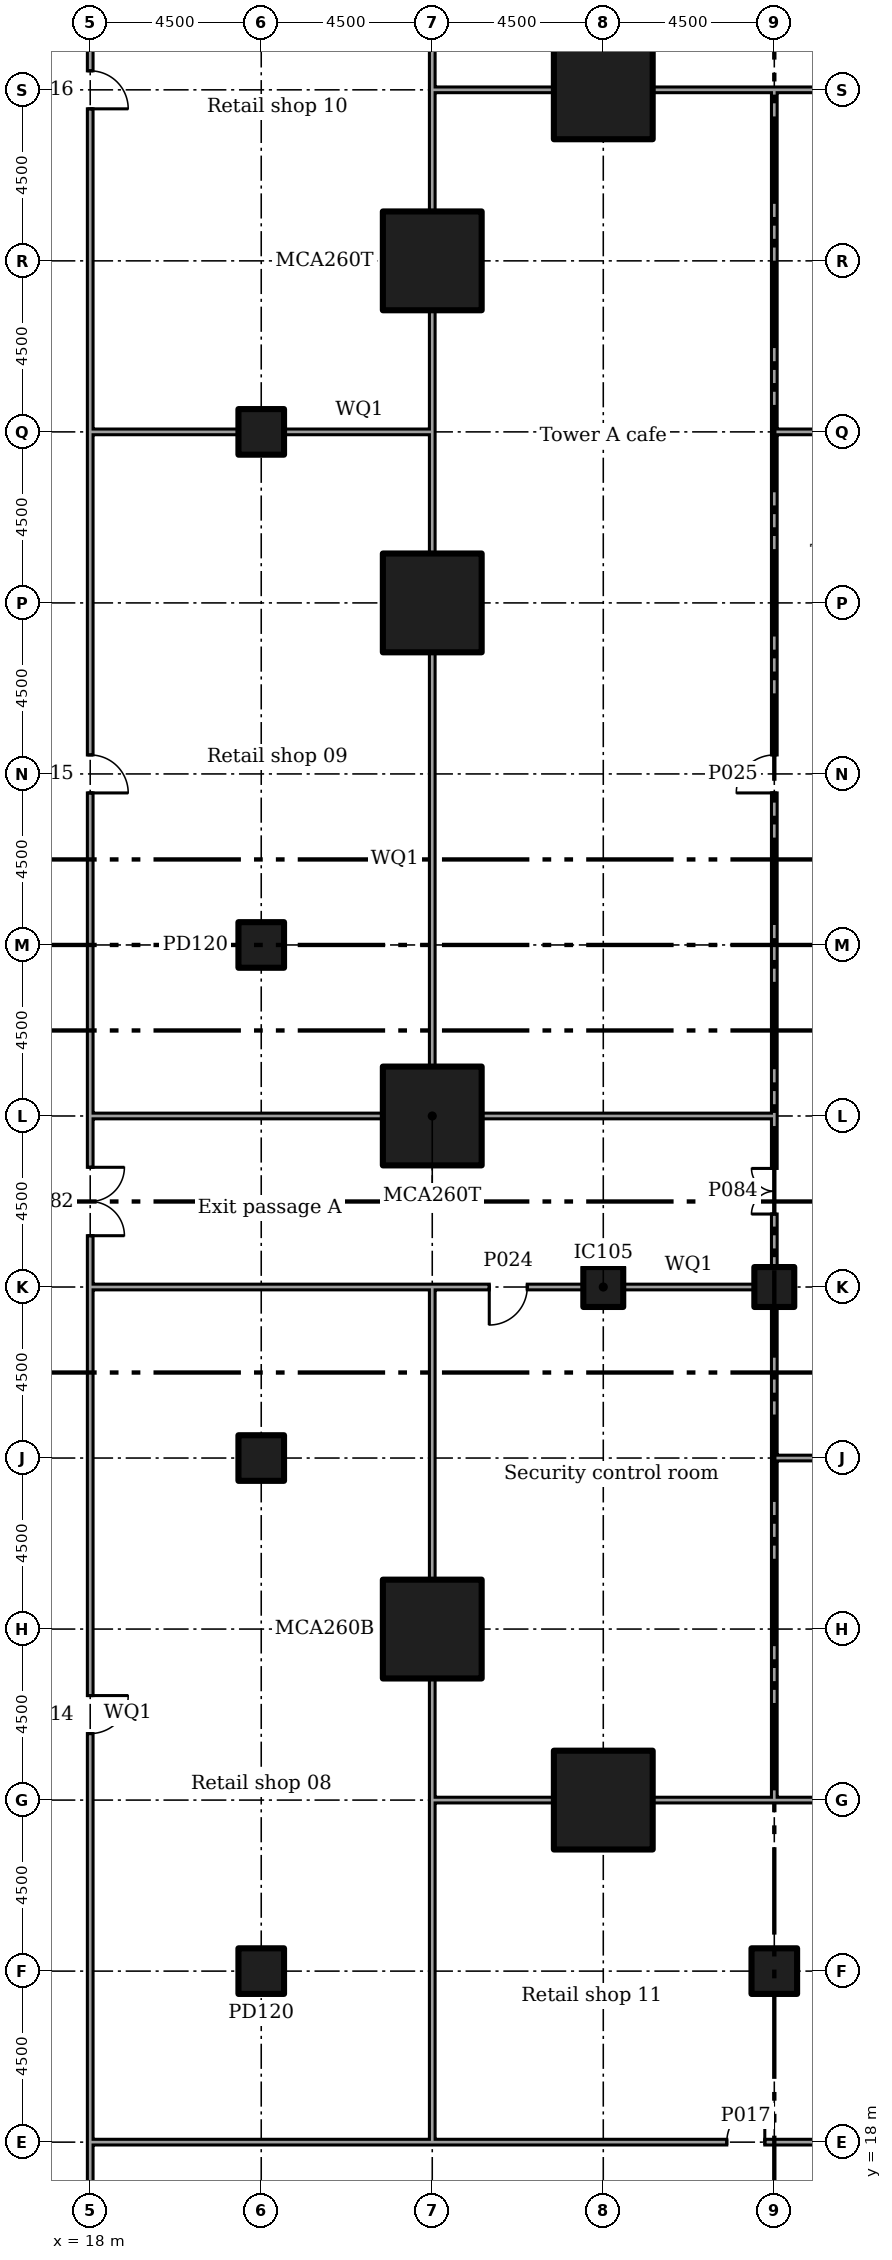
"""IFC4 building model, lengths in metres.
Left out: names, types, materials, properties, quantities, classifications, styles, units other than length and angle.
Written with IfcOpenShell. Run it as: python <this file> out.ifc"""

import sys

from ifc_helpers import new_model, si_unit, direction, frame, frame_2d, origin, origin_2d, place, context, subcontext, project, spatial, rectangle, extrude, element, fill, save


model = new_model("IFC4")
c1 = context("Model", 3, precision=1e-05, world=origin(), true_north=direction((0.0, 1.0)))
c2 = subcontext(c1, "Body", "Model", "MODEL_VIEW")
j1 = project(units=[si_unit("LENGTHUNIT", "METRE"), si_unit("PLANEANGLEUNIT", "RADIAN")], contexts=[c1])
p1 = place(None, origin())
s1 = spatial("IfcSite", under=j1, at=p1, CompositionType="ELEMENT")
p2 = place(p1, origin())
s2 = spatial("IfcBuilding", under=s1, at=p2, CompositionType="ELEMENT")
p3 = place(p2, origin())
s3 = spatial("IfcBuildingStorey", under=s2, at=p3, CompositionType="ELEMENT", Elevation=0.0)
for number, where in (
    (1, (27.0, 31.5, 0.0)),
    (2, (27.0, 45.0, 0.0)),
    (3, (27.0, 58.5, 0.0)),
    (4, (27.0, 67.5, 0.0)),
    (5, (31.5, 27.0, 0.0)),
    (6, (31.5, 72.0, 0.0)),
):
    element("IfcColumn", number, at=place(p3, frame(where)), inside=s3, PredefinedType="COLUMN", context=c2, shape_type="SweptSolid", body=[
        extrude(rectangle(XDim=2.6, YDim=2.6, at=origin_2d()), origin(), (0.0, 0.0, 1.0), 6.0),
    ])
for number, where in (
    (7, (31.5, 40.5, 0.0)),
    (8, (36.0, 40.5, 0.0)),
):
    element("IfcColumn", number, at=place(p3, frame(where)), inside=s3, PredefinedType="COLUMN", context=c2, shape_type="SweptSolid", body=[
        extrude(rectangle(XDim=1.05, YDim=1.05, at=origin_2d()), origin(), (0.0, 0.0, 1.0), 6.0),
    ])
for number, where in (
    (9, (22.5, 22.5, 0.0)),
    (10, (22.5, 36.0, 0.0)),
    (11, (22.5, 49.5, 0.0)),
    (12, (22.5, 63.0, 0.0)),
    (13, (36.0, 22.5, 0.0)),
):
    element("IfcColumn", number, at=place(p3, frame(where)), inside=s3, PredefinedType="COLUMN", context=c2, shape_type="SweptSolid", body=[
        extrude(rectangle(XDim=1.2, YDim=1.2, at=origin_2d()), origin(), (0.0, 0.0, 1.0), 6.0),
    ])
p4 = place(p3, frame((18.0, 9.075, 0.0), z_axis=(0.0, 0.0, 1.0), x_axis=(0.0, 1.0, 0.0)))
e14 = element("IfcWall", 14, at=p4, inside=s3, PredefinedType="PARTITIONING", context=c2, shape_type="SweptSolid", body=[
    extrude(rectangle(XDim=9.0, YDim=0.15, at=frame_2d((4.5, 0.0))), origin(), (0.0, 0.0, 1.0), 5.55),
])
p5 = place(p4, frame((3.525, 0.0, 0.0)))
e15 = element("IfcOpeningElement", 15, at=p5, cuts=e14, PredefinedType="OPENING", context=c2, shape_type="SweptSolid", body=[
    extrude(rectangle(XDim=1.8, YDim=2.1, at=frame_2d((0.9, 1.05))), frame((0.0, 0.085, 0.0), z_axis=(0.0, -1.0, 0.0), x_axis=(1.0, 0.0, 0.0)), (0.0, 0.0, 1.0), 0.17),
])
p6 = place(p3, frame((18.075, 18.0, 0.0)))
e16 = element("IfcWall", 16, at=p6, inside=s3, PredefinedType="PARTITIONING", context=c2, shape_type="SweptSolid", body=[
    extrude(rectangle(XDim=9.0, YDim=0.15, at=frame_2d((4.5, 0.0))), origin(), (0.0, 0.0, 1.0), 5.55),
])
p7 = place(p3, frame((27.0, 18.0, 0.0)))
e17 = element("IfcWall", 17, at=p7, inside=s3, PredefinedType="PARTITIONING", context=c2, shape_type="SweptSolid", body=[
    extrude(rectangle(XDim=16.575, YDim=0.15, at=frame_2d((8.288, 0.0))), origin(), (0.0, 0.0, 1.0), 5.55),
])
p8 = place(p7, frame((7.75, 0.0, 0.0)))
e18 = element("IfcOpeningElement", 18, at=p8, cuts=e17, PredefinedType="OPENING", context=c2, shape_type="SweptSolid", body=[
    extrude(rectangle(XDim=1.0, YDim=2.1, at=frame_2d((0.5, 1.05))), frame((0.0, 0.085, 0.0), z_axis=(0.0, -1.0, 0.0), x_axis=(1.0, 0.0, 0.0)), (0.0, 0.0, 1.0), 0.17),
])
p9 = place(p3, frame((18.0, 18.0, 0.0), z_axis=(0.0, 0.0, 1.0), x_axis=(0.0, 1.0, 0.0)))
e19 = element("IfcWall", 19, at=p9, inside=s3, PredefinedType="PARTITIONING", context=c2, shape_type="SweptSolid", body=[
    extrude(rectangle(XDim=22.575, YDim=0.15, at=frame_2d((11.288, 0.0))), origin(), (0.0, 0.0, 1.0), 5.55),
])
p10 = place(p9, frame((10.75, 0.0, 0.0)))
e20 = element("IfcOpeningElement", 20, at=p10, cuts=e19, PredefinedType="OPENING", context=c2, shape_type="SweptSolid", body=[
    extrude(rectangle(XDim=1.0, YDim=2.1, at=frame_2d((0.5, 1.05))), frame((0.0, 0.085, 0.0), z_axis=(0.0, -1.0, 0.0), x_axis=(1.0, 0.0, 0.0)), (0.0, 0.0, 1.0), 0.17),
])
p11 = place(p3, frame((18.0, 40.5, 0.0), z_axis=(0.0, 0.0, 1.0), x_axis=(0.0, 1.0, 0.0)))
e21 = element("IfcWall", 21, at=p11, inside=s3, PredefinedType="PARTITIONING", context=c2, shape_type="SweptSolid", body=[
    extrude(rectangle(XDim=4.575, YDim=0.15, at=frame_2d((2.288, 0.0))), origin(), (0.0, 0.0, 1.0), 5.55),
])
p12 = place(p11, frame((1.35, 0.0, 0.0)))
e22 = element("IfcOpeningElement", 22, at=p12, cuts=e21, PredefinedType="OPENING", context=c2, shape_type="SweptSolid", body=[
    extrude(rectangle(XDim=1.8, YDim=2.1, at=frame_2d((0.9, 1.05))), frame((0.0, 0.085, 0.0), z_axis=(0.0, -1.0, 0.0), x_axis=(1.0, 0.0, 0.0)), (0.0, 0.0, 1.0), 0.17),
])
p13 = place(p3, frame((18.0, 45.0, 0.0), z_axis=(0.0, 0.0, 1.0), x_axis=(0.0, 1.0, 0.0)))
e23 = element("IfcWall", 23, at=p13, inside=s3, PredefinedType="PARTITIONING", context=c2, shape_type="SweptSolid", body=[
    extrude(rectangle(XDim=18.075, YDim=0.15, at=frame_2d((9.038, 0.0))), origin(), (0.0, 0.0, 1.0), 5.55),
])
p14 = place(p13, frame((8.5, 0.0, 0.0)))
e24 = element("IfcOpeningElement", 24, at=p14, cuts=e23, PredefinedType="OPENING", context=c2, shape_type="SweptSolid", body=[
    extrude(rectangle(XDim=1.0, YDim=2.1, at=frame_2d((0.5, 1.05))), frame((0.0, 0.085, 0.0), z_axis=(0.0, -1.0, 0.0), x_axis=(1.0, 0.0, 0.0)), (0.0, 0.0, 1.0), 0.17),
])
p15 = place(p3, frame((18.0, 63.0, 0.0), z_axis=(0.0, 0.0, 1.0), x_axis=(0.0, 1.0, 0.0)))
e25 = element("IfcWall", 25, at=p15, inside=s3, PredefinedType="PARTITIONING", context=c2, shape_type="SweptSolid", body=[
    extrude(rectangle(XDim=18.0, YDim=0.15, at=frame_2d((9.0, 0.0))), origin(), (0.0, 0.0, 1.0), 5.55),
])
p16 = place(p15, frame((8.5, 0.0, 0.0)))
e26 = element("IfcOpeningElement", 26, at=p16, cuts=e25, PredefinedType="OPENING", context=c2, shape_type="SweptSolid", body=[
    extrude(rectangle(XDim=1.0, YDim=2.1, at=frame_2d((0.5, 1.05))), frame((0.0, 0.085, 0.0), z_axis=(0.0, -1.0, 0.0), x_axis=(1.0, 0.0, 0.0)), (0.0, 0.0, 1.0), 0.17),
])
p17 = place(p3, frame((18.075, 40.5, 0.0)))
e27 = element("IfcWall", 27, at=p17, inside=s3, PredefinedType="PARTITIONING", context=c2, shape_type="SweptSolid", body=[
    extrude(rectangle(XDim=9.0, YDim=0.15, at=frame_2d((4.5, 0.0))), origin(), (0.0, 0.0, 1.0), 5.55),
])
p18 = place(p3, frame((27.0, 18.075, 0.0), z_axis=(0.0, 0.0, 1.0), x_axis=(0.0, 1.0, 0.0)))
e28 = element("IfcWall", 28, at=p18, inside=s3, PredefinedType="PARTITIONING", context=c2, shape_type="SweptSolid", body=[
    extrude(rectangle(XDim=9.0, YDim=0.15, at=frame_2d((4.5, 0.0))), origin(), (0.0, 0.0, 1.0), 5.55),
])
p19 = place(p3, frame((27.0, 27.0, 0.0), z_axis=(0.0, 0.0, 1.0), x_axis=(0.0, 1.0, 0.0)))
e29 = element("IfcWall", 29, at=p19, inside=s3, PredefinedType="PARTITIONING", context=c2, shape_type="SweptSolid", body=[
    extrude(rectangle(XDim=3.205, YDim=0.15, at=frame_2d((1.603, 0.0))), origin(), (0.0, 0.0, 1.0), 5.55),
])
p20 = place(p3, frame((27.0, 32.795, 0.0), z_axis=(0.0, 0.0, 1.0), x_axis=(0.0, 1.0, 0.0)))
e30 = element("IfcWall", 30, at=p20, inside=s3, PredefinedType="PARTITIONING", context=c2, shape_type="SweptSolid", body=[
    extrude(rectangle(XDim=7.63, YDim=0.15, at=frame_2d((3.815, 0.0))), origin(), (0.0, 0.0, 1.0), 5.55),
])
p21 = place(p3, frame((18.075, 45.0, 0.0)))
e31 = element("IfcWall", 31, at=p21, inside=s3, PredefinedType="PARTITIONING", context=c2, shape_type="SweptSolid", body=[
    extrude(rectangle(XDim=7.63, YDim=0.15, at=frame_2d((3.815, 0.0))), origin(), (0.0, 0.0, 1.0), 5.55),
])
p22 = place(p3, frame((27.0, 40.5, 0.0)))
e32 = element("IfcWall", 32, at=p22, inside=s3, PredefinedType="PARTITIONING", context=c2, shape_type="SweptSolid", body=[
    extrude(rectangle(XDim=3.98, YDim=0.15, at=frame_2d((1.99, 0.0))), origin(), (0.0, 0.0, 1.0), 5.55),
])
p23 = place(p22, frame((1.5, 0.0, 0.0)))
e33 = element("IfcOpeningElement", 33, at=p23, cuts=e32, PredefinedType="OPENING", context=c2, shape_type="SweptSolid", body=[
    extrude(rectangle(XDim=1.0, YDim=2.1, at=frame_2d((0.5, 1.05))), frame((0.0, 0.085, 0.0), z_axis=(0.0, -1.0, 0.0), x_axis=(1.0, 0.0, 0.0)), (0.0, 0.0, 1.0), 0.17),
])
p24 = place(p3, frame((32.02, 40.5, 0.0)))
e34 = element("IfcWall", 34, at=p24, inside=s3, PredefinedType="PARTITIONING", context=c2, shape_type="SweptSolid", body=[
    extrude(rectangle(XDim=3.46, YDim=0.15, at=frame_2d((1.73, 0.0))), origin(), (0.0, 0.0, 1.0), 5.55),
])
p25 = place(p3, frame((28.295, 45.0, 0.0)))
e35 = element("IfcWall", 35, at=p25, inside=s3, PredefinedType="PARTITIONING", context=c2, shape_type="SweptSolid", body=[
    extrude(rectangle(XDim=7.78, YDim=0.15, at=frame_2d((3.89, 0.0))), origin(), (0.0, 0.0, 1.0), 5.55),
])
p26 = place(p3, frame((36.0, 41.02, 0.0), z_axis=(0.0, 0.0, 1.0), x_axis=(0.0, 1.0, 0.0)))
e36 = element("IfcWall", 36, at=p26, inside=s3, PredefinedType="PARTITIONING", context=c2, shape_type="SweptSolid", body=[
    extrude(rectangle(XDim=3.905, YDim=0.15, at=frame_2d((1.953, 0.0))), origin(), (0.0, 0.0, 1.0), 5.55),
])
p27 = place(p26, frame((1.4, 0.0, 0.0)))
e37 = element("IfcOpeningElement", 37, at=p27, cuts=e36, PredefinedType="OPENING", context=c2, shape_type="SweptSolid", body=[
    extrude(rectangle(XDim=1.2, YDim=2.1, at=frame_2d((0.6, 1.05))), frame((0.0, 0.085, 0.0), z_axis=(0.0, -1.0, 0.0), x_axis=(1.0, 0.0, 0.0)), (0.0, 0.0, 1.0), 0.17),
])
p28 = place(p3, frame((18.075, 63.0, 0.0)))
e38 = element("IfcWall", 38, at=p28, inside=s3, PredefinedType="PARTITIONING", context=c2, shape_type="SweptSolid", body=[
    extrude(rectangle(XDim=3.83, YDim=0.15, at=frame_2d((1.915, 0.0))), origin(), (0.0, 0.0, 1.0), 5.55),
])
p29 = place(p3, frame((23.095, 63.0, 0.0)))
e39 = element("IfcWall", 39, at=p29, inside=s3, PredefinedType="PARTITIONING", context=c2, shape_type="SweptSolid", body=[
    extrude(rectangle(XDim=3.98, YDim=0.15, at=frame_2d((1.99, 0.0))), origin(), (0.0, 0.0, 1.0), 5.55),
])
p30 = place(p3, frame((27.0, 46.295, 0.0), z_axis=(0.0, 0.0, 1.0), x_axis=(0.0, 1.0, 0.0)))
e40 = element("IfcWall", 40, at=p30, inside=s3, PredefinedType="PARTITIONING", context=c2, shape_type="SweptSolid", body=[
    extrude(rectangle(XDim=10.91, YDim=0.15, at=frame_2d((5.455, 0.0))), origin(), (0.0, 0.0, 1.0), 5.55),
])
p31 = place(p3, frame((27.0, 59.795, 0.0), z_axis=(0.0, 0.0, 1.0), x_axis=(0.0, 1.0, 0.0)))
e41 = element("IfcWall", 41, at=p31, inside=s3, PredefinedType="PARTITIONING", context=c2, shape_type="SweptSolid", body=[
    extrude(rectangle(XDim=3.13, YDim=0.15, at=frame_2d((1.565, 0.0))), origin(), (0.0, 0.0, 1.0), 5.55),
])
p32 = place(p3, frame((27.0, 71.925, 0.0), z_axis=(0.0, 0.0, 1.0), x_axis=(0.0, 1.0, 0.0)))
e42 = element("IfcWall", 42, at=p32, inside=s3, PredefinedType="PARTITIONING", context=c2, shape_type="SweptSolid", body=[
    extrude(rectangle(XDim=9.0, YDim=0.15, at=frame_2d((4.5, 0.0))), origin(), (0.0, 0.0, 1.0), 5.55),
])
for number, where, z_axis, x_axis in (
    (43, (27.0, 63.0, 0.0), (0.0, 0.0, 1.0), (0.0, 1.0, 0.0)),
    (44, (27.0, 68.795, 0.0), (0.0, 0.0, 1.0), (0.0, 1.0, 0.0)),
):
    element("IfcWall", number, at=place(p3, frame(where, z_axis=z_axis, x_axis=x_axis)), inside=s3, PredefinedType="PARTITIONING", context=c2, shape_type="SweptSolid", body=[
        extrude(rectangle(XDim=3.205, YDim=0.15, at=frame_2d((1.603, 0.0))), origin(), (0.0, 0.0, 1.0), 5.55),
    ])
p33 = place(p3, frame((27.075, 27.0, 0.0)))
e45 = element("IfcWall", 45, at=p33, inside=s3, PredefinedType="PARTITIONING", context=c2, shape_type="SweptSolid", body=[
    extrude(rectangle(XDim=3.13, YDim=0.15, at=frame_2d((1.565, 0.0))), origin(), (0.0, 0.0, 1.0), 5.55),
])
p34 = place(p3, frame((32.795, 27.0, 0.0)))
e46 = element("IfcWall", 46, at=p34, inside=s3, PredefinedType="PARTITIONING", context=c2, shape_type="SweptSolid", body=[
    extrude(rectangle(XDim=3.28, YDim=0.15, at=frame_2d((1.64, 0.0))), origin(), (0.0, 0.0, 1.0), 5.55),
])
p35 = place(p3, frame((36.0, 27.0, 0.0)))
e47 = element("IfcWall", 47, at=p35, inside=s3, PredefinedType="PARTITIONING", context=c2, shape_type="SweptSolid", body=[
    extrude(rectangle(XDim=7.425, YDim=0.15, at=frame_2d((3.712, 0.0))), origin(), (0.0, 0.0, 1.0), 5.55),
])
p36 = place(p3, frame((27.075, 72.0, 0.0)))
e48 = element("IfcWall", 48, at=p36, inside=s3, PredefinedType="PARTITIONING", context=c2, shape_type="SweptSolid", body=[
    extrude(rectangle(XDim=3.13, YDim=0.15, at=frame_2d((1.565, 0.0))), origin(), (0.0, 0.0, 1.0), 5.55),
])
p37 = place(p3, frame((32.795, 72.0, 0.0)))
e49 = element("IfcWall", 49, at=p37, inside=s3, PredefinedType="PARTITIONING", context=c2, shape_type="SweptSolid", body=[
    extrude(rectangle(XDim=3.28, YDim=0.15, at=frame_2d((1.64, 0.0))), origin(), (0.0, 0.0, 1.0), 5.55),
])
p38 = place(p3, frame((36.0, 72.0, 0.0)))
e50 = element("IfcWall", 50, at=p38, inside=s3, PredefinedType="PARTITIONING", context=c2, shape_type="SweptSolid", body=[
    extrude(rectangle(XDim=6.0, YDim=0.15, at=frame_2d((3.0, 0.0))), origin(), (0.0, 0.0, 1.0), 5.55),
])
p39 = place(p3, frame((36.0, 27.075, 0.0), z_axis=(0.0, 0.0, 1.0), x_axis=(0.0, 1.0, 0.0)))
e51 = element("IfcWall", 51, at=p39, inside=s3, PredefinedType="PARTITIONING", context=c2, shape_type="SweptSolid", body=[
    extrude(rectangle(XDim=9.0, YDim=0.15, at=frame_2d((4.5, 0.0))), origin(), (0.0, 0.0, 1.0), 5.55),
])
p40 = place(p3, frame((36.0, 36.0, 0.0), z_axis=(0.0, 0.0, 1.0), x_axis=(0.0, 1.0, 0.0)))
e52 = element("IfcWall", 52, at=p40, inside=s3, PredefinedType="PARTITIONING", context=c2, shape_type="SweptSolid", body=[
    extrude(rectangle(XDim=3.98, YDim=0.15, at=frame_2d((1.99, 0.0))), origin(), (0.0, 0.0, 1.0), 5.55),
])
p41 = place(p3, frame((36.0, 62.925, 0.0), z_axis=(0.0, 0.0, 1.0), x_axis=(0.0, 1.0, 0.0)))
e53 = element("IfcWall", 53, at=p41, inside=s3, PredefinedType="PARTITIONING", context=c2, shape_type="SweptSolid", body=[
    extrude(rectangle(XDim=9.0, YDim=0.15, at=frame_2d((4.5, 0.0))), origin(), (0.0, 0.0, 1.0), 5.55),
])
p42 = place(p3, frame((36.0, 45.0, 0.0), z_axis=(0.0, 0.0, 1.0), x_axis=(0.0, 1.0, 0.0)))
e54 = element("IfcWall", 54, at=p42, inside=s3, PredefinedType="PARTITIONING", context=c2, shape_type="SweptSolid", body=[
    extrude(rectangle(XDim=18.0, YDim=0.15, at=frame_2d((9.0, 0.0))), origin(), (0.0, 0.0, 1.0), 5.55),
])
p43 = place(p42, frame((8.5, 0.0, 0.0)))
e55 = element("IfcOpeningElement", 55, at=p43, cuts=e54, PredefinedType="OPENING", context=c2, shape_type="SweptSolid", body=[
    extrude(rectangle(XDim=1.0, YDim=2.1, at=frame_2d((0.5, 1.05))), frame((0.0, 0.085, 0.0), z_axis=(0.0, -1.0, 0.0), x_axis=(1.0, 0.0, 0.0)), (0.0, 0.0, 1.0), 0.17),
])
p44 = place(p3, frame((36.075, 36.0, 0.0)))
e56 = element("IfcWall", 56, at=p44, inside=s3, PredefinedType="PARTITIONING", context=c2, shape_type="SweptSolid", body=[
    extrude(rectangle(XDim=14.425, YDim=0.15, at=frame_2d((7.212, 0.0))), origin(), (0.0, 0.0, 1.0), 5.55),
])
p45 = place(p44, frame((6.675, 0.0, 0.0)))
e57 = element("IfcOpeningElement", 57, at=p45, cuts=e56, PredefinedType="OPENING", context=c2, shape_type="SweptSolid", body=[
    extrude(rectangle(XDim=1.0, YDim=2.1, at=frame_2d((0.5, 1.05))), frame((0.0, 0.085, 0.0), z_axis=(0.0, -1.0, 0.0), x_axis=(1.0, 0.0, 0.0)), (0.0, 0.0, 1.0), 0.17),
])
p46 = place(p3, frame((36.075, 63.0, 0.0)))
e58 = element("IfcWall", 58, at=p46, inside=s3, PredefinedType="PARTITIONING", context=c2, shape_type="SweptSolid", body=[
    extrude(rectangle(XDim=3.905, YDim=0.15, at=frame_2d((1.953, 0.0))), origin(), (0.0, 0.0, 1.0), 5.55),
])
p47 = place(p46, frame((1.425, 0.0, 0.0)))
e59 = element("IfcOpeningElement", 59, at=p47, cuts=e58, PredefinedType="OPENING", context=c2, shape_type="SweptSolid", body=[
    extrude(rectangle(XDim=1.0, YDim=2.1, at=frame_2d((0.5, 1.05))), frame((0.0, 0.085, 0.0), z_axis=(0.0, -1.0, 0.0), x_axis=(1.0, 0.0, 0.0)), (0.0, 0.0, 1.0), 0.17),
])
p48 = place(p10, frame((1.0, 0.0, 0.0), x_axis=(-1.0, 0.0, 0.0)))
e60 = element("IfcDoor", 60, at=p48, inside=s3, OperationType="SINGLE_SWING_RIGHT", PredefinedType="DOOR", context=c2, shape_type="SweptSolid", body=[
    extrude(rectangle(XDim=1.0, YDim=2.1, at=frame_2d((0.5, 1.05))), frame((0.0, 0.025, 0.0), z_axis=(0.0, -1.0, 0.0), x_axis=(1.0, 0.0, 0.0)), (0.0, 0.0, 1.0), 0.05),
])
fill(e20, e60)
p49 = place(p14, frame((1.0, 0.0, 0.0), x_axis=(-1.0, 0.0, 0.0)))
e61 = element("IfcDoor", 61, at=p49, inside=s3, OperationType="SINGLE_SWING_LEFT", PredefinedType="DOOR", context=c2, shape_type="SweptSolid", body=[
    extrude(rectangle(XDim=1.0, YDim=2.1, at=frame_2d((0.5, 1.05))), frame((0.0, 0.025, 0.0), z_axis=(0.0, -1.0, 0.0), x_axis=(1.0, 0.0, 0.0)), (0.0, 0.0, 1.0), 0.05),
])
fill(e24, e61)
p50 = place(p16, frame((1.0, 0.0, 0.0), x_axis=(-1.0, 0.0, 0.0)))
e62 = element("IfcDoor", 62, at=p50, inside=s3, OperationType="SINGLE_SWING_LEFT", PredefinedType="DOOR", context=c2, shape_type="SweptSolid", body=[
    extrude(rectangle(XDim=1.0, YDim=2.1, at=frame_2d((0.5, 1.05))), frame((0.0, 0.025, 0.0), z_axis=(0.0, -1.0, 0.0), x_axis=(1.0, 0.0, 0.0)), (0.0, 0.0, 1.0), 0.05),
])
fill(e26, e62)
p51 = place(p8, origin())
e63 = element("IfcDoor", 63, at=p51, inside=s3, OperationType="SINGLE_SWING_LEFT", PredefinedType="DOOR", context=c2, shape_type="SweptSolid", body=[
    extrude(rectangle(XDim=1.0, YDim=2.1, at=frame_2d((0.5, 1.05))), frame((0.0, 0.025, 0.0), z_axis=(0.0, -1.0, 0.0), x_axis=(1.0, 0.0, 0.0)), (0.0, 0.0, 1.0), 0.05),
])
fill(e18, e63)
p52 = place(p23, frame((1.0, 0.0, 0.0), x_axis=(-1.0, 0.0, 0.0)))
e64 = element("IfcDoor", 64, at=p52, inside=s3, OperationType="SINGLE_SWING_LEFT", PredefinedType="DOOR", context=c2, shape_type="SweptSolid", body=[
    extrude(rectangle(XDim=1.0, YDim=2.1, at=frame_2d((0.5, 1.05))), frame((0.0, 0.025, 0.0), z_axis=(0.0, -1.0, 0.0), x_axis=(1.0, 0.0, 0.0)), (0.0, 0.0, 1.0), 0.05),
])
fill(e33, e64)
p53 = place(p43, origin())
e65 = element("IfcDoor", 65, at=p53, inside=s3, OperationType="SINGLE_SWING_RIGHT", PredefinedType="DOOR", context=c2, shape_type="SweptSolid", body=[
    extrude(rectangle(XDim=1.0, YDim=2.1, at=frame_2d((0.5, 1.05))), frame((0.0, 0.025, 0.0), z_axis=(0.0, -1.0, 0.0), x_axis=(1.0, 0.0, 0.0)), (0.0, 0.0, 1.0), 0.05),
])
fill(e55, e65)
p54 = place(p12, frame((1.8, 0.0, 0.0), x_axis=(-1.0, 0.0, 0.0)))
e66 = element("IfcDoor", 66, at=p54, inside=s3, OperationType="DOUBLE_DOOR_SINGLE_SWING", PredefinedType="DOOR", context=c2, shape_type="SweptSolid", body=[
    extrude(rectangle(XDim=1.8, YDim=2.1, at=frame_2d((0.9, 1.05))), frame((0.0, 0.025, 0.0), z_axis=(0.0, -1.0, 0.0), x_axis=(1.0, 0.0, 0.0)), (0.0, 0.0, 1.0), 0.05),
])
fill(e22, e66)
p55 = place(p27, origin())
e67 = element("IfcDoor", 67, at=p55, inside=s3, OperationType="DOUBLE_DOOR_SINGLE_SWING", PredefinedType="DOOR", context=c2, shape_type="SweptSolid", body=[
    extrude(rectangle(XDim=1.2, YDim=2.1, at=frame_2d((0.6, 1.05))), frame((0.0, 0.025, 0.0), z_axis=(0.0, -1.0, 0.0), x_axis=(1.0, 0.0, 0.0)), (0.0, 0.0, 1.0), 0.05),
])
fill(e37, e67)
save(model, sys.argv[1])
